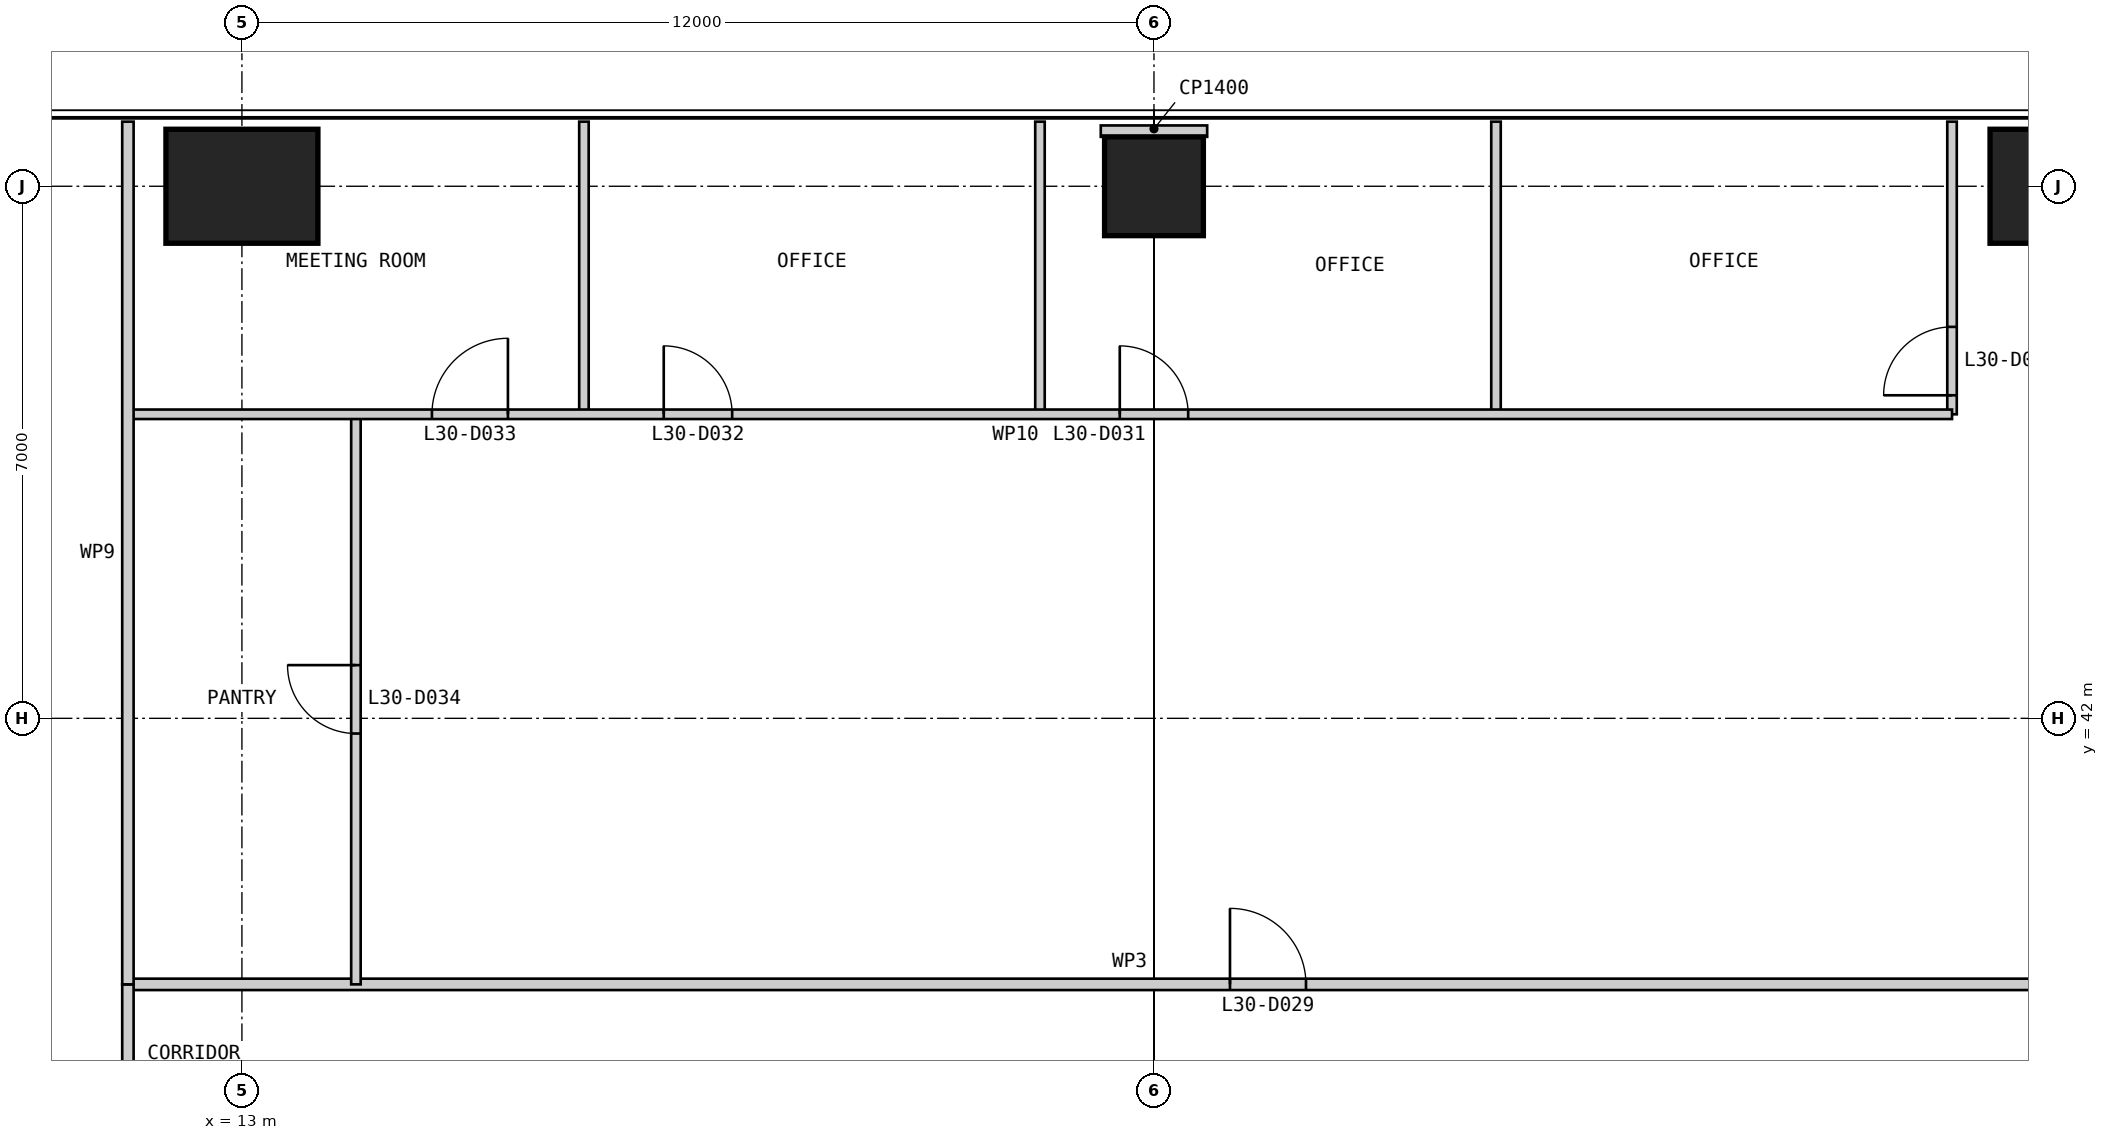
"""IFC4 building model, lengths in metres.
Left out: names, types, materials, properties, quantities, classifications, styles, units other than length and angle.
Written with IfcOpenShell. Run it as: python <this file> out.ifc"""

import sys

from ifc_helpers import new_model, si_unit, direction, frame, frame_2d, origin, origin_2d, place, context, subcontext, project, spatial, rectangle, extrude, element, fill, save


model = new_model("IFC4")
c1 = context("Model", 3, precision=1e-05, world=origin(), true_north=direction((0.0, 1.0)))
c2 = subcontext(c1, "Body", "Model", "MODEL_VIEW")
j1 = project(units=[si_unit("LENGTHUNIT", "METRE"), si_unit("PLANEANGLEUNIT", "RADIAN")], contexts=[c1])
p1 = place(None, origin())
s1 = spatial("IfcSite", under=j1, at=p1, CompositionType="ELEMENT")
p2 = place(p1, origin())
s2 = spatial("IfcBuilding", under=s1, at=p2, CompositionType="ELEMENT")
p3 = place(p2, frame((0.0, 0.0, 130.4)))
s3 = spatial("IfcBuildingStorey", under=s2, at=p3, CompositionType="ELEMENT", Elevation=130.4)
p4 = place(p3, frame((37.0, 49.0, 0.0), z_axis=(0.0, 0.0, 1.0), x_axis=(1.0, 0.0, 0.0)))
e1 = element("IfcColumn", 1, at=p4, inside=s3, PredefinedType="COLUMN", context=c2, shape_type="SweptSolid", body=[
    extrude(rectangle(XDim=2.0, YDim=1.5, at=origin_2d()), origin(), (0.0, 0.0, 1.0), 4.0),
])
p5 = place(p3, frame((25.0, 49.0, 0.0), z_axis=(0.0, 0.0, 1.0), x_axis=(1.0, 0.0, 0.0)))
e2 = element("IfcColumn", 2, at=p5, inside=s3, PredefinedType="COLUMN", context=c2, shape_type="SweptSolid", body=[
    extrude(rectangle(XDim=1.3, YDim=1.3, at=origin_2d()), origin(), (0.0, 0.0, 1.0), 4.0),
])
p6 = place(p3, frame((13.0, 49.0, 0.0), z_axis=(0.0, 0.0, 1.0), x_axis=(1.0, 0.0, 0.0)))
e3 = element("IfcColumn", 3, at=p6, inside=s3, PredefinedType="COLUMN", context=c2, shape_type="SweptSolid", body=[
    extrude(rectangle(XDim=2.0, YDim=1.5, at=origin_2d()), origin(), (0.0, 0.0, 1.0), 4.0),
])
p7 = place(p3, frame((38.5, 38.5, 0.0), z_axis=(0.0, 0.0, 1.0), x_axis=(-1.0, 0.0, 0.0)))
e4 = element("IfcWall", 4, at=p7, inside=s3, PredefinedType="PARTITIONING", context=c2, shape_type="SweptSolid", body=[
    extrude(rectangle(XDim=27.0, YDim=0.15, at=frame_2d((13.5, 0.0))), origin(), (0.0, 0.0, 1.0), 3.85),
])
p8 = place(p7, frame((11.5, 0.0, 0.0)))
e5 = element("IfcOpeningElement", 5, at=p8, cuts=e4, PredefinedType="OPENING", context=c2, shape_type="SweptSolid", body=[
    extrude(rectangle(XDim=1.0, YDim=2.2, at=frame_2d((0.5, 1.1))), frame((0.0, 0.085, 0.0), z_axis=(0.0, -1.0, 0.0), x_axis=(1.0, 0.0, 0.0)), (0.0, 0.0, 1.0), 0.17),
])
p9 = place(p3, frame((35.5, 49.85, 0.0), z_axis=(0.0, 0.0, 1.0), x_axis=(0.0, -1.0, 0.0)))
e6 = element("IfcWall", 6, at=p9, inside=s3, PredefinedType="PARTITIONING", context=c2, shape_type="SweptSolid", body=[
    extrude(rectangle(XDim=3.85, YDim=0.125, at=frame_2d((1.925, 0.0))), origin(), (0.0, 0.0, 1.0), 3.85),
])
p10 = place(p9, frame((2.7, 0.0, 0.0)))
e7 = element("IfcOpeningElement", 7, at=p10, cuts=e6, PredefinedType="OPENING", context=c2, shape_type="SweptSolid", body=[
    extrude(rectangle(XDim=0.9, YDim=2.2, at=frame_2d((0.45, 1.1))), frame((0.0, 0.073, 0.0), z_axis=(0.0, -1.0, 0.0), x_axis=(1.0, 0.0, 0.0)), (0.0, 0.0, 1.0), 0.145),
])
for number, where, z_axis, x_axis in (
    (8, (29.5, 49.85, 0.0), (0.0, 0.0, 1.0), (0.0, -1.0, 0.0)),
    (9, (23.5, 49.85, 0.0), (0.0, 0.0, 1.0), (0.0, -1.0, 0.0)),
    (10, (17.5, 49.85, 0.0), (0.0, 0.0, 1.0), (0.0, -1.0, 0.0)),
):
    element("IfcWall", number, at=place(p3, frame(where, z_axis=z_axis, x_axis=x_axis)), inside=s3, PredefinedType="PARTITIONING", context=c2, shape_type="SweptSolid", body=[
        extrude(rectangle(XDim=3.85, YDim=0.125, at=frame_2d((1.925, 0.0))), origin(), (0.0, 0.0, 1.0), 3.85),
    ])
p11 = place(p3, frame((14.5, 46.0, 0.0), z_axis=(0.0, 0.0, 1.0), x_axis=(0.0, -1.0, 0.0)))
e11 = element("IfcWall", 11, at=p11, inside=s3, PredefinedType="PARTITIONING", context=c2, shape_type="SweptSolid", body=[
    extrude(rectangle(XDim=7.5, YDim=0.125, at=frame_2d((3.75, 0.0))), origin(), (0.0, 0.0, 1.0), 3.85),
])
p12 = place(p11, frame((3.3, 0.0, 0.0)))
e12 = element("IfcOpeningElement", 12, at=p12, cuts=e11, PredefinedType="OPENING", context=c2, shape_type="SweptSolid", body=[
    extrude(rectangle(XDim=0.9, YDim=2.2, at=frame_2d((0.45, 1.1))), frame((0.0, 0.073, 0.0), z_axis=(0.0, -1.0, 0.0), x_axis=(1.0, 0.0, 0.0)), (0.0, 0.0, 1.0), 0.145),
])
p13 = place(p3, frame((35.5, 46.0, 0.0), z_axis=(0.0, 0.0, 1.0), x_axis=(-1.0, 0.0, 0.0)))
e13 = element("IfcWall", 13, at=p13, inside=s3, PredefinedType="PARTITIONING", context=c2, shape_type="SweptSolid", body=[
    extrude(rectangle(XDim=24.0, YDim=0.125, at=frame_2d((12.0, 0.0))), origin(), (0.0, 0.0, 1.0), 3.85),
])
p14 = place(p13, frame((10.05, 0.0, 0.0)))
e14 = element("IfcOpeningElement", 14, at=p14, cuts=e13, PredefinedType="OPENING", context=c2, shape_type="SweptSolid", body=[
    extrude(rectangle(XDim=0.9, YDim=2.2, at=frame_2d((0.45, 1.1))), frame((0.0, 0.073, 0.0), z_axis=(0.0, -1.0, 0.0), x_axis=(1.0, 0.0, 0.0)), (0.0, 0.0, 1.0), 0.145),
])
p15 = place(p13, frame((16.05, 0.0, 0.0)))
e15 = element("IfcOpeningElement", 15, at=p15, cuts=e13, PredefinedType="OPENING", context=c2, shape_type="SweptSolid", body=[
    extrude(rectangle(XDim=0.9, YDim=2.2, at=frame_2d((0.45, 1.1))), frame((0.0, 0.073, 0.0), z_axis=(0.0, -1.0, 0.0), x_axis=(1.0, 0.0, 0.0)), (0.0, 0.0, 1.0), 0.145),
])
p16 = place(p13, frame((19.0, 0.0, 0.0)))
e16 = element("IfcOpeningElement", 16, at=p16, cuts=e13, PredefinedType="OPENING", context=c2, shape_type="SweptSolid", body=[
    extrude(rectangle(XDim=1.0, YDim=2.2, at=frame_2d((0.5, 1.1))), frame((0.0, 0.073, 0.0), z_axis=(0.0, -1.0, 0.0), x_axis=(1.0, 0.0, 0.0)), (0.0, 0.0, 1.0), 0.145),
])
p17 = place(p3, frame((11.5, 38.5, 0.0), z_axis=(0.0, 0.0, 1.0), x_axis=(0.0, -1.0, 0.0)))
e17 = element("IfcWall", 17, at=p17, inside=s3, PredefinedType="PARTITIONING", context=c2, shape_type="SweptSolid", body=[
    extrude(rectangle(XDim=27.0, YDim=0.15, at=frame_2d((13.5, 0.0))), origin(), (0.0, 0.0, 1.0), 3.85),
])
p18 = place(p17, frame((2.5, 0.0, 0.0)))
e18 = element("IfcOpeningElement", 18, at=p18, cuts=e17, PredefinedType="OPENING", context=c2, shape_type="SweptSolid", body=[
    extrude(rectangle(XDim=1.0, YDim=2.2, at=frame_2d((0.5, 1.1))), frame((0.0, 0.085, 0.0), z_axis=(0.0, -1.0, 0.0), x_axis=(1.0, 0.0, 0.0)), (0.0, 0.0, 1.0), 0.17),
])
p19 = place(p17, frame((16.0, 0.0, 0.0)))
e19 = element("IfcOpeningElement", 19, at=p19, cuts=e17, PredefinedType="OPENING", context=c2, shape_type="SweptSolid", body=[
    extrude(rectangle(XDim=1.0, YDim=2.2, at=frame_2d((0.5, 1.1))), frame((0.0, 0.085, 0.0), z_axis=(0.0, -1.0, 0.0), x_axis=(1.0, 0.0, 0.0)), (0.0, 0.0, 1.0), 0.17),
])
p20 = place(p3, frame((11.5, 49.85, 0.0), z_axis=(0.0, 0.0, 1.0), x_axis=(0.0, -1.0, 0.0)))
e20 = element("IfcWall", 20, at=p20, inside=s3, PredefinedType="PARTITIONING", context=c2, shape_type="SweptSolid", body=[
    extrude(rectangle(XDim=11.35, YDim=0.15, at=frame_2d((5.675, 0.0))), origin(), (0.0, 0.0, 1.0), 3.85),
])
p21 = place(p3, frame((25.0, 49.8, 0.0), z_axis=(0.0, 0.0, 1.0), x_axis=(0.0, -1.0, 0.0)))
e21 = element("IfcWall", 21, at=p21, inside=s3, PredefinedType="PARTITIONING", context=c2, shape_type="SweptSolid", body=[
    extrude(rectangle(XDim=0.15, YDim=1.4, at=frame_2d((0.075, 0.0))), origin(), (0.0, 0.0, 1.0), 3.85),
])
p22 = place(p8, frame((1.0, 0.0, 0.0), z_axis=(0.0, 0.0, 1.0), x_axis=(-1.0, 0.0, 0.0)))
e22 = element("IfcDoor", 22, at=p22, inside=s3, OperationType="SINGLE_SWING_LEFT", PredefinedType="DOOR", context=c2, shape_type="SweptSolid", body=[
    extrude(rectangle(XDim=1.0, YDim=2.2, at=frame_2d((0.5, 1.1))), frame((0.0, 0.025, 0.0), z_axis=(0.0, -1.0, 0.0), x_axis=(1.0, 0.0, 0.0)), (0.0, 0.0, 1.0), 0.05),
])
fill(e5, e22)
p23 = place(p10, frame((0.9, 0.0, 0.0), z_axis=(0.0, 0.0, 1.0), x_axis=(-1.0, 0.0, 0.0)))
e23 = element("IfcDoor", 23, at=p23, inside=s3, OperationType="SINGLE_SWING_LEFT", PredefinedType="DOOR", context=c2, shape_type="SweptSolid", body=[
    extrude(rectangle(XDim=0.9, YDim=2.2, at=frame_2d((0.45, 1.1))), frame((0.0, 0.025, 0.0), z_axis=(0.0, -1.0, 0.0), x_axis=(1.0, 0.0, 0.0)), (0.0, 0.0, 1.0), 0.05),
])
fill(e7, e23)
p24 = place(p14, frame((0.9, 0.0, 0.0), z_axis=(0.0, 0.0, 1.0), x_axis=(-1.0, 0.0, 0.0)))
e24 = element("IfcDoor", 24, at=p24, inside=s3, OperationType="SINGLE_SWING_LEFT", PredefinedType="DOOR", context=c2, shape_type="SweptSolid", body=[
    extrude(rectangle(XDim=0.9, YDim=2.2, at=frame_2d((0.45, 1.1))), frame((0.0, 0.025, 0.0), z_axis=(0.0, -1.0, 0.0), x_axis=(1.0, 0.0, 0.0)), (0.0, 0.0, 1.0), 0.05),
])
fill(e14, e24)
p25 = place(p15, frame((0.9, 0.0, 0.0), z_axis=(0.0, 0.0, 1.0), x_axis=(-1.0, 0.0, 0.0)))
e25 = element("IfcDoor", 25, at=p25, inside=s3, OperationType="SINGLE_SWING_LEFT", PredefinedType="DOOR", context=c2, shape_type="SweptSolid", body=[
    extrude(rectangle(XDim=0.9, YDim=2.2, at=frame_2d((0.45, 1.1))), frame((0.0, 0.025, 0.0), z_axis=(0.0, -1.0, 0.0), x_axis=(1.0, 0.0, 0.0)), (0.0, 0.0, 1.0), 0.05),
])
fill(e15, e25)
p26 = place(p16, frame((1.0, 0.0, 0.0), z_axis=(0.0, 0.0, 1.0), x_axis=(-1.0, 0.0, 0.0)))
e26 = element("IfcDoor", 26, at=p26, inside=s3, OperationType="SINGLE_SWING_RIGHT", PredefinedType="DOOR", context=c2, shape_type="SweptSolid", body=[
    extrude(rectangle(XDim=1.0, YDim=2.2, at=frame_2d((0.5, 1.1))), frame((0.0, 0.025, 0.0), z_axis=(0.0, -1.0, 0.0), x_axis=(1.0, 0.0, 0.0)), (0.0, 0.0, 1.0), 0.05),
])
fill(e16, e26)
p27 = place(p12, frame((0.9, 0.0, 0.0), z_axis=(0.0, 0.0, 1.0), x_axis=(-1.0, 0.0, 0.0)))
e27 = element("IfcDoor", 27, at=p27, inside=s3, OperationType="SINGLE_SWING_RIGHT", PredefinedType="DOOR", context=c2, shape_type="SweptSolid", body=[
    extrude(rectangle(XDim=0.9, YDim=2.2, at=frame_2d((0.45, 1.1))), frame((0.0, 0.025, 0.0), z_axis=(0.0, -1.0, 0.0), x_axis=(1.0, 0.0, 0.0)), (0.0, 0.0, 1.0), 0.05),
])
fill(e12, e27)
save(model, sys.argv[1])
